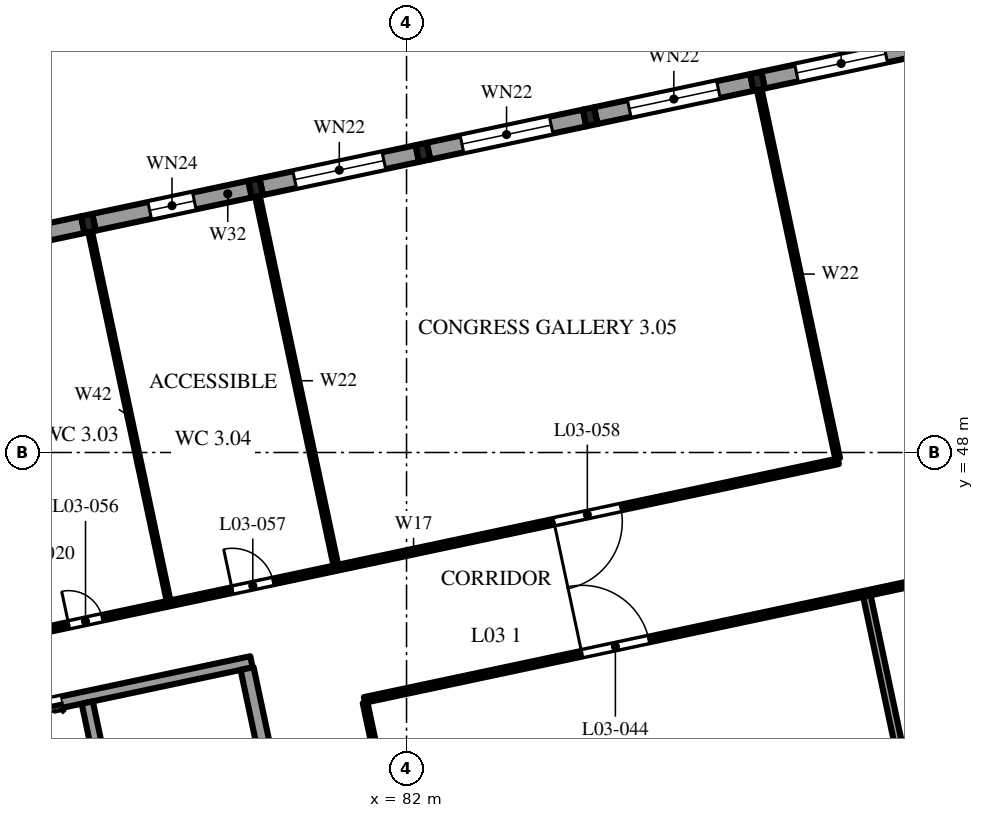
"""IFC4 building model, lengths in metres.
Left out: names, types, materials, properties, quantities, classifications, styles, units other than length and angle.
Written with IfcOpenShell. Run it as: python <this file> out.ifc"""

import sys

from ifc_helpers import new_model, si_unit, direction, frame, frame_2d, origin, origin_2d, place, context, subcontext, project, spatial, polyline, rectangle, i_section, outline, extrude, element, fill, save


model = new_model("IFC4")
c1 = context("Model", 3, precision=1e-05, world=origin(), true_north=direction((0.0, 1.0)))
c2 = subcontext(c1, "Body", "Model", "MODEL_VIEW")
j1 = project(units=[si_unit("LENGTHUNIT", "METRE"), si_unit("PLANEANGLEUNIT", "RADIAN")], contexts=[c1])
p1 = place(None, origin())
s1 = spatial("IfcSite", under=j1, at=p1, CompositionType="ELEMENT")
p2 = place(p1, origin())
s2 = spatial("IfcBuilding", under=s1, at=p2, CompositionType="ELEMENT")
p3 = place(p2, frame((0.0, 0.0, 16.8)))
s3 = spatial("IfcBuildingStorey", under=s2, at=p3, CompositionType="ELEMENT", Elevation=16.8)
for number, where, z_axis, x_axis in (
    (1, (73.628, 54.027, 0.0), (0.0, 0.0, 1.0), (0.978, 0.208, 0.0)),
    (2, (78.03, 54.963, 0.0), (0.0, 0.0, 1.0), (0.978, 0.208, 0.0)),
    (3, (82.431, 55.898, 0.0), (0.0, 0.0, 1.0), (0.978, 0.208, 0.0)),
    (4, (86.833, 56.834, 0.0), (0.0, 0.0, 1.0), (0.978, 0.208, 0.0)),
    (5, (91.234, 57.77, 0.0), (0.0, 0.0, 1.0), (0.978, 0.208, 0.0)),
):
    element("IfcColumn", number, at=place(p3, frame(where, z_axis=z_axis, x_axis=x_axis)), inside=s3, PredefinedType="COLUMN", context=c2, shape_type="SweptSolid", body=[
        extrude(i_section(OverallWidth=0.3, OverallDepth=0.45, WebThickness=0.014, FlangeThickness=0.026, FilletRadius=0.027, at=origin_2d()), origin(), (0.0, 0.0, 1.0), 4.8),
    ])
p4 = place(p3, frame((64.519, 39.644, 0.0), z_axis=(0.0, 0.0, 1.0), x_axis=(0.978147662755, 0.20791139903, 0.0)))
e6 = element("IfcWall", 6, at=p4, inside=s3, PredefinedType="SHEAR", context=c2, shape_type="SweptSolid", body=[
    extrude(outline(polyline([(0.0, 0.0), (13.7, 0.0), (13.7, 7.26), (0.0, 6.527), (0.0, 0.0)])), frame((0.0, 0.15, 0.0), z_axis=(0.0, -1.0, 0.0), x_axis=(1.0, 0.0, 0.0)), (0.0, 0.0, 1.0), 0.3),
])
p5 = place(p4, frame((5.1, 0.0, 0.0)))
e7 = element("IfcOpeningElement", 7, at=p5, cuts=e6, PredefinedType="OPENING", context=c2, shape_type="SweptSolid", body=[
    extrude(rectangle(XDim=1.1, YDim=2.1, at=frame_2d((0.55, 1.05))), frame((0.0, 0.16, 0.0), z_axis=(0.0, -1.0, 0.0), x_axis=(1.0, 0.0, 0.0)), (0.0, 0.0, 1.0), 0.32),
])
p6 = place(p4, frame((7.5, 0.0, 0.0)))
e8 = element("IfcOpeningElement", 8, at=p6, cuts=e6, PredefinedType="OPENING", context=c2, shape_type="SweptSolid", body=[
    extrude(rectangle(XDim=1.1, YDim=2.1, at=frame_2d((0.55, 1.05))), frame((0.0, 0.16, 0.0), z_axis=(0.0, -1.0, 0.0), x_axis=(1.0, 0.0, 0.0)), (0.0, 0.0, 1.0), 0.32),
])
p7 = place(p3, frame((79.468, 34.49, 0.0), z_axis=(0.0, 0.0, 1.0), x_axis=(-0.207915693476, 0.978146749934, 0.0)))
e9 = element("IfcWall", 9, at=p7, inside=s3, PredefinedType="SOLIDWALL", context=c2, shape_type="SweptSolid", body=[
    extrude(outline(polyline([(0.0, 0.0), (8.0, 0.0), (8.0, 7.26), (0.0, 7.679), (0.0, 0.0)])), frame((0.0, 0.175, 0.0), z_axis=(0.0, -1.0, 0.0), x_axis=(1.0, 0.0, 0.0)), (0.0, 0.0, 1.0), 0.35),
])
p8 = place(p7, frame((0.3, 0.0, 0.0)))
e10 = element("IfcOpeningElement", 10, at=p8, cuts=e9, PredefinedType="OPENING", context=c2, shape_type="SweptSolid", body=[
    extrude(rectangle(XDim=1.2, YDim=2.1, at=frame_2d((0.6, 1.05))), frame((0.0, 0.185, 0.0), z_axis=(0.0, -1.0, 0.0), x_axis=(1.0, 0.0, 0.0)), (0.0, 0.0, 1.0), 0.37),
])
p9 = place(p3, frame((75.261, 33.595, 0.0), z_axis=(0.0, 0.0, 1.0), x_axis=(-0.207915693476, 0.978146749934, 0.0)))
e11 = element("IfcWall", 11, at=p9, inside=s3, PredefinedType="SHEAR", context=c2, shape_type="SweptSolid", body=[
    extrude(outline(polyline([(0.0, 0.0), (8.0, 0.0), (8.0, 7.03), (0.0, 7.449), (0.0, 0.0)])), frame((0.0, 0.15, 0.0), z_axis=(0.0, -1.0, 0.0), x_axis=(1.0, 0.0, 0.0)), (0.0, 0.0, 1.0), 0.3),
])
p10 = place(p3, frame((69.373, 53.123, 0.0), z_axis=(0.0, 0.0, 1.0), x_axis=(0.978143927149, 0.207928972925, 0.0)))
e12 = element("IfcWall", 12, at=p10, inside=s3, PredefinedType="SOLIDWALL", context=c2, shape_type="SweptSolid", body=[
    extrude(outline(polyline([(0.0, 0.0), (4.2, 0.0), (4.2, 7.817), (0.0, 7.593), (0.0, 0.0)])), frame((0.0, 0.225, 0.0), z_axis=(0.0, -1.0, 0.0), x_axis=(1.0, 0.0, 0.0)), (0.0, 0.0, 1.0), 0.45),
])
p11 = place(p10, frame((1.5, 0.0, 1.5)))
e13 = element("IfcOpeningElement", 13, at=p11, cuts=e12, PredefinedType="OPENING", context=c2, shape_type="SweptSolid", body=[
    extrude(rectangle(XDim=1.2, YDim=1.2, at=frame_2d((0.6, 0.6))), frame((0.0, 0.235, 0.0), z_axis=(0.0, -1.0, 0.0), x_axis=(1.0, 0.0, 0.0)), (0.0, 0.0, 1.0), 0.47),
])
p12 = place(p3, frame((73.774, 54.058, 0.0), z_axis=(0.0, 0.0, 1.0), x_axis=(0.978146440129, 0.207917150959, 0.0)))
e14 = element("IfcWall", 14, at=p12, inside=s3, PredefinedType="SOLIDWALL", context=c2, shape_type="SweptSolid", body=[
    extrude(outline(polyline([(0.0, 0.0), (4.2, 0.0), (4.2, 8.058), (0.0, 7.833), (0.0, 0.0)])), frame((0.0, 0.225, 0.0), z_axis=(0.0, -1.0, 0.0), x_axis=(1.0, 0.0, 0.0)), (0.0, 0.0, 1.0), 0.45),
])
p13 = place(p12, frame((1.5, 0.0, 1.5)))
e15 = element("IfcOpeningElement", 15, at=p13, cuts=e14, PredefinedType="OPENING", context=c2, shape_type="SweptSolid", body=[
    extrude(rectangle(XDim=1.2, YDim=1.2, at=frame_2d((0.6, 0.6))), frame((0.0, 0.235, 0.0), z_axis=(0.0, -1.0, 0.0), x_axis=(1.0, 0.0, 0.0)), (0.0, 0.0, 1.0), 0.47),
])
p14 = place(p3, frame((78.176, 54.994, 0.0), z_axis=(0.0, 0.0, 1.0), x_axis=(0.978143927149, 0.207928972925, 0.0)))
e16 = element("IfcWall", 16, at=p14, inside=s3, PredefinedType="SOLIDWALL", context=c2, shape_type="SweptSolid", body=[
    extrude(outline(polyline([(0.0, 0.0), (4.2, 0.0), (4.2, 8.299), (0.0, 8.074), (0.0, 0.0)])), frame((0.0, 0.225, 0.0), z_axis=(0.0, -1.0, 0.0), x_axis=(1.0, 0.0, 0.0)), (0.0, 0.0, 1.0), 0.45),
])
p15 = place(p14, frame((0.9, 0.0, 0.9)))
e17 = element("IfcOpeningElement", 17, at=p15, cuts=e16, PredefinedType="OPENING", context=c2, shape_type="SweptSolid", body=[
    extrude(rectangle(XDim=2.4, YDim=2.4, at=frame_2d((1.2, 1.2))), frame((0.0, 0.235, 0.0), z_axis=(0.0, -1.0, 0.0), x_axis=(1.0, 0.0, 0.0)), (0.0, 0.0, 1.0), 0.47),
])
p16 = place(p3, frame((82.578, 55.93, 0.0), z_axis=(0.0, 0.0, 1.0), x_axis=(0.978155748334, 0.207873355681, 0.0)))
e18 = element("IfcWall", 18, at=p16, inside=s3, PredefinedType="SOLIDWALL", context=c2, shape_type="SweptSolid", body=[
    extrude(outline(polyline([(0.0, 0.0), (4.2, 0.0), (4.2, 8.54), (0.0, 8.315), (0.0, 0.0)])), frame((0.0, 0.225, 0.0), z_axis=(0.0, -1.0, 0.0), x_axis=(1.0, 0.0, 0.0)), (0.0, 0.0, 1.0), 0.45),
])
p17 = place(p16, frame((0.9, 0.0, 0.9)))
e19 = element("IfcOpeningElement", 19, at=p17, cuts=e18, PredefinedType="OPENING", context=c2, shape_type="SweptSolid", body=[
    extrude(rectangle(XDim=2.4, YDim=2.4, at=frame_2d((1.2, 1.2))), frame((0.0, 0.235, 0.0), z_axis=(0.0, -1.0, 0.0), x_axis=(1.0, 0.0, 0.0)), (0.0, 0.0, 1.0), 0.47),
])
p18 = place(p3, frame((86.979, 56.865, 0.0), z_axis=(0.0, 0.0, 1.0), x_axis=(0.978143927149, 0.207928972925, 0.0)))
e20 = element("IfcWall", 20, at=p18, inside=s3, PredefinedType="SOLIDWALL", context=c2, shape_type="SweptSolid", body=[
    extrude(outline(polyline([(0.0, 0.0), (4.2, 0.0), (4.2, 8.78), (0.0, 8.556), (0.0, 0.0)])), frame((0.0, 0.225, 0.0), z_axis=(0.0, -1.0, 0.0), x_axis=(1.0, 0.0, 0.0)), (0.0, 0.0, 1.0), 0.45),
])
p19 = place(p18, frame((0.9, 0.0, 0.9)))
e21 = element("IfcOpeningElement", 21, at=p19, cuts=e20, PredefinedType="OPENING", context=c2, shape_type="SweptSolid", body=[
    extrude(rectangle(XDim=2.4, YDim=2.4, at=frame_2d((1.2, 1.2))), frame((0.0, 0.235, 0.0), z_axis=(0.0, -1.0, 0.0), x_axis=(1.0, 0.0, 0.0)), (0.0, 0.0, 1.0), 0.47),
])
p20 = place(p3, frame((91.381, 57.801, 0.0), z_axis=(0.0, 0.0, 1.0), x_axis=(0.978143927149, 0.207928972925, 0.0)))
e22 = element("IfcWall", 22, at=p20, inside=s3, PredefinedType="SOLIDWALL", context=c2, shape_type="SweptSolid", body=[
    extrude(outline(polyline([(0.0, 0.0), (4.2, 0.0), (4.2, 9.021), (0.0, 8.796), (0.0, 0.0)])), frame((0.0, 0.225, 0.0), z_axis=(0.0, -1.0, 0.0), x_axis=(1.0, 0.0, 0.0)), (0.0, 0.0, 1.0), 0.45),
])
p21 = place(p20, frame((0.9, 0.0, 0.45)))
e23 = element("IfcOpeningElement", 23, at=p21, cuts=e22, PredefinedType="OPENING", context=c2, shape_type="SweptSolid", body=[
    extrude(rectangle(XDim=2.4, YDim=3.3, at=frame_2d((1.2, 1.65))), frame((0.0, 0.235, 0.0), z_axis=(0.0, -1.0, 0.0), x_axis=(1.0, 0.0, 0.0)), (0.0, 0.0, 1.0), 0.47),
])
p22 = place(p3, frame((80.893, 41.489, 0.0), z_axis=(0.0, 0.0, 1.0), x_axis=(0.97814724207, 0.20791337819, 0.0)))
e24 = element("IfcWall", 24, at=p22, inside=s3, PredefinedType="PARTITIONING", context=c2, shape_type="SweptSolid", body=[
    extrude(outline(polyline([(0.0, 0.0), (49.5, 0.0), (49.5, 9.336), (0.0, 6.688), (0.0, 0.0)])), frame((0.0, 0.075, 0.0), z_axis=(0.0, -1.0, 0.0), x_axis=(1.0, 0.0, 0.0)), (0.0, 0.0, 1.0), 0.15),
])
p23 = place(p22, frame((5.85, 0.0, 0.0)))
e25 = element("IfcOpeningElement", 25, at=p23, cuts=e24, PredefinedType="OPENING", context=c2, shape_type="SweptSolid", body=[
    extrude(rectangle(XDim=1.8, YDim=2.1, at=frame_2d((0.9, 1.05))), frame((0.0, 0.085, 0.0), z_axis=(0.0, -1.0, 0.0), x_axis=(1.0, 0.0, 0.0)), (0.0, 0.0, 1.0), 0.17),
])
p24 = place(p22, frame((17.25, 0.0, 0.0)))
e26 = element("IfcOpeningElement", 26, at=p24, cuts=e24, PredefinedType="OPENING", context=c2, shape_type="SweptSolid", body=[
    extrude(rectangle(XDim=1.5, YDim=2.1, at=frame_2d((0.75, 1.05))), frame((0.0, 0.085, 0.0), z_axis=(0.0, -1.0, 0.0), x_axis=(1.0, 0.0, 0.0)), (0.0, 0.0, 1.0), 0.17),
])
p25 = place(p22, frame((28.35, 0.0, 0.0)))
e27 = element("IfcOpeningElement", 27, at=p25, cuts=e24, PredefinedType="OPENING", context=c2, shape_type="SweptSolid", body=[
    extrude(rectangle(XDim=1.8, YDim=2.1, at=frame_2d((0.9, 1.05))), frame((0.0, 0.085, 0.0), z_axis=(0.0, -1.0, 0.0), x_axis=(1.0, 0.0, 0.0)), (0.0, 0.0, 1.0), 0.17),
])
p26 = place(p22, frame((41.85, 0.0, 0.0)))
e28 = element("IfcOpeningElement", 28, at=p26, cuts=e24, PredefinedType="OPENING", context=c2, shape_type="SweptSolid", body=[
    extrude(rectangle(XDim=1.8, YDim=2.1, at=frame_2d((0.9, 1.05))), frame((0.0, 0.085, 0.0), z_axis=(0.0, -1.0, 0.0), x_axis=(1.0, 0.0, 0.0)), (0.0, 0.0, 1.0), 0.17),
])
p27 = place(p3, frame((82.972, 31.707, 0.0), z_axis=(0.0, 0.0, 1.0), x_axis=(-0.207904355568, 0.978149159861, 0.0)))
e29 = element("IfcWall", 29, at=p27, inside=s3, PredefinedType="PARTITIONING", context=c2, shape_type="SweptSolid", body=[
    extrude(outline(polyline([(0.0, 0.0), (9.925, 0.0), (9.925, 5.973), (0.0, 5.973), (0.0, 0.0)])), frame((0.0, 0.062, 0.0), z_axis=(0.0, -1.0, 0.0), x_axis=(1.0, 0.0, 0.0)), (0.0, 0.0, 1.0), 0.125),
])
p28 = place(p3, frame((96.177, 34.514, 0.0), z_axis=(0.0, 0.0, 1.0), x_axis=(-0.20790935802, 0.978148096582, 0.0)))
e30 = element("IfcWall", 30, at=p28, inside=s3, PredefinedType="PARTITIONING", context=c2, shape_type="SweptSolid", body=[
    extrude(outline(polyline([(0.0, 0.0), (9.925, 0.0), (9.925, 6.696), (0.0, 6.696), (0.0, 0.0)])), frame((0.0, 0.1, 0.0), z_axis=(0.0, -1.0, 0.0), x_axis=(1.0, 0.0, 0.0)), (0.0, 0.0, 1.0), 0.2),
])
p29 = place(p3, frame((59.663, 40.605, 0.0), z_axis=(0.0, 0.0, 1.0), x_axis=(0.978147466509, 0.207912322295, 0.0)))
e31 = element("IfcWall", 31, at=p29, inside=s3, PredefinedType="PARTITIONING", context=c2, shape_type="SweptSolid", body=[
    extrude(outline(polyline([(0.0, 0.0), (34.45, 0.0), (34.45, 7.224), (0.0, 5.381), (0.0, 0.0)])), frame((0.0, 0.075, 0.0), z_axis=(0.0, -1.0, 0.0), x_axis=(1.0, 0.0, 0.0)), (0.0, 0.0, 1.0), 0.15),
])
p30 = place(p29, frame((3.225, 0.0, 0.0)))
e32 = element("IfcOpeningElement", 32, at=p30, cuts=e31, PredefinedType="OPENING", context=c2, shape_type="SweptSolid", body=[
    extrude(rectangle(XDim=1.0, YDim=2.1, at=frame_2d((0.5, 1.05))), frame((0.0, 0.085, 0.0), z_axis=(0.0, -1.0, 0.0), x_axis=(1.0, 0.0, 0.0)), (0.0, 0.0, 1.0), 0.17),
])
p31 = place(p29, frame((9.25, 0.0, 0.0)))
e33 = element("IfcOpeningElement", 33, at=p31, cuts=e31, PredefinedType="OPENING", context=c2, shape_type="SweptSolid", body=[
    extrude(rectangle(XDim=0.9, YDim=2.1, at=frame_2d((0.45, 1.05))), frame((0.0, 0.085, 0.0), z_axis=(0.0, -1.0, 0.0), x_axis=(1.0, 0.0, 0.0)), (0.0, 0.0, 1.0), 0.17),
])
p32 = place(p29, frame((13.75, 0.0, 0.0)))
e34 = element("IfcOpeningElement", 34, at=p32, cuts=e31, PredefinedType="OPENING", context=c2, shape_type="SweptSolid", body=[
    extrude(rectangle(XDim=0.9, YDim=2.1, at=frame_2d((0.45, 1.05))), frame((0.0, 0.085, 0.0), z_axis=(0.0, -1.0, 0.0), x_axis=(1.0, 0.0, 0.0)), (0.0, 0.0, 1.0), 0.17),
])
p33 = place(p29, frame((18.15, 0.0, 0.0)))
e35 = element("IfcOpeningElement", 35, at=p33, cuts=e31, PredefinedType="OPENING", context=c2, shape_type="SweptSolid", body=[
    extrude(rectangle(XDim=1.1, YDim=2.1, at=frame_2d((0.55, 1.05))), frame((0.0, 0.085, 0.0), z_axis=(0.0, -1.0, 0.0), x_axis=(1.0, 0.0, 0.0)), (0.0, 0.0, 1.0), 0.17),
])
p34 = place(p29, frame((26.8, 0.0, 0.0)))
e36 = element("IfcOpeningElement", 36, at=p34, cuts=e31, PredefinedType="OPENING", context=c2, shape_type="SweptSolid", body=[
    extrude(rectangle(XDim=1.8, YDim=2.1, at=frame_2d((0.9, 1.05))), frame((0.0, 0.085, 0.0), z_axis=(0.0, -1.0, 0.0), x_axis=(1.0, 0.0, 0.0)), (0.0, 0.0, 1.0), 0.17),
])
p35 = place(p3, frame((73.675, 53.807, 0.0), z_axis=(0.0, 0.0, 1.0), x_axis=(0.207904355568, -0.978149159861, 0.0)))
e37 = element("IfcWall", 37, at=p35, inside=s3, PredefinedType="PARTITIONING", context=c2, shape_type="SweptSolid", body=[
    extrude(outline(polyline([(0.0, 0.0), (9.925, 0.0), (9.925, 6.032), (0.0, 5.737), (0.0, 0.0)])), frame((0.0, 0.05, 0.0), z_axis=(0.0, -1.0, 0.0), x_axis=(1.0, 0.0, 0.0)), (0.0, 0.0, 1.0), 0.1),
])
p36 = place(p3, frame((78.076, 54.743, 0.0), z_axis=(0.0, 0.0, 1.0), x_axis=(0.20790935802, -0.978148096582, 0.0)))
e38 = element("IfcWall", 38, at=p36, inside=s3, PredefinedType="PARTITIONING", context=c2, shape_type="SweptSolid", body=[
    extrude(outline(polyline([(0.0, 0.0), (9.925, 0.0), (9.925, 5.973), (0.0, 5.973), (0.0, 0.0)])), frame((0.0, 0.062, 0.0), z_axis=(0.0, -1.0, 0.0), x_axis=(1.0, 0.0, 0.0)), (0.0, 0.0, 1.0), 0.125),
])
p37 = place(p3, frame((91.281, 57.55, 0.0), z_axis=(0.0, 0.0, 1.0), x_axis=(0.207904355568, -0.978149159861, 0.0)))
e39 = element("IfcWall", 39, at=p37, inside=s3, PredefinedType="PARTITIONING", context=c2, shape_type="SweptSolid", body=[
    extrude(outline(polyline([(0.0, 0.0), (9.925, 0.0), (9.925, 6.696), (0.0, 6.696), (0.0, 0.0)])), frame((0.0, 0.062, 0.0), z_axis=(0.0, -1.0, 0.0), x_axis=(1.0, 0.0, 0.0)), (0.0, 0.0, 1.0), 0.125),
])
p38 = place(p13, origin())
e40 = element("IfcWindow", 40, at=p38, inside=s3, PartitioningType="SINGLE_PANEL", PredefinedType="WINDOW", context=c2, shape_type="SweptSolid", body=[
    extrude(rectangle(XDim=1.2, YDim=1.2, at=frame_2d((0.6, 0.6))), frame((0.0, 0.03, 0.0), z_axis=(0.0, -1.0, 0.0), x_axis=(1.0, 0.0, 0.0)), (0.0, 0.0, 1.0), 0.06),
])
fill(e15, e40)
p39 = place(p15, origin())
e41 = element("IfcWindow", 41, at=p39, inside=s3, PartitioningType="SINGLE_PANEL", PredefinedType="WINDOW", context=c2, shape_type="SweptSolid", body=[
    extrude(rectangle(XDim=2.4, YDim=2.4, at=frame_2d((1.2, 1.2))), frame((0.0, 0.03, 0.0), z_axis=(0.0, -1.0, 0.0), x_axis=(1.0, 0.0, 0.0)), (0.0, 0.0, 1.0), 0.06),
])
fill(e17, e41)
p40 = place(p17, origin())
e42 = element("IfcWindow", 42, at=p40, inside=s3, PartitioningType="SINGLE_PANEL", PredefinedType="WINDOW", context=c2, shape_type="SweptSolid", body=[
    extrude(rectangle(XDim=2.4, YDim=2.4, at=frame_2d((1.2, 1.2))), frame((0.0, 0.03, 0.0), z_axis=(0.0, -1.0, 0.0), x_axis=(1.0, 0.0, 0.0)), (0.0, 0.0, 1.0), 0.06),
])
fill(e19, e42)
p41 = place(p19, origin())
e43 = element("IfcWindow", 43, at=p41, inside=s3, PartitioningType="SINGLE_PANEL", PredefinedType="WINDOW", context=c2, shape_type="SweptSolid", body=[
    extrude(rectangle(XDim=2.4, YDim=2.4, at=frame_2d((1.2, 1.2))), frame((0.0, 0.03, 0.0), z_axis=(0.0, -1.0, 0.0), x_axis=(1.0, 0.0, 0.0)), (0.0, 0.0, 1.0), 0.06),
])
fill(e21, e43)
p42 = place(p21, origin())
e44 = element("IfcWindow", 44, at=p42, inside=s3, PartitioningType="DOUBLE_PANEL_VERTICAL", PredefinedType="WINDOW", context=c2, shape_type="SweptSolid", body=[
    extrude(rectangle(XDim=2.4, YDim=3.3, at=frame_2d((1.2, 1.65))), frame((0.0, 0.03, 0.0), z_axis=(0.0, -1.0, 0.0), x_axis=(1.0, 0.0, 0.0)), (0.0, 0.0, 1.0), 0.06),
])
fill(e23, e44)
p43 = place(p6, origin())
e45 = element("IfcDoor", 45, at=p43, inside=s3, OperationType="DOUBLE_DOOR_SLIDING", PredefinedType="DOOR", context=c2, shape_type="SweptSolid", body=[
    extrude(rectangle(XDim=1.1, YDim=2.1, at=frame_2d((0.55, 1.05))), frame((0.0, 0.025, 0.0), z_axis=(0.0, -1.0, 0.0), x_axis=(1.0, 0.0, 0.0)), (0.0, 0.0, 1.0), 0.05),
])
fill(e8, e45)
p44 = place(p23, origin())
e46 = element("IfcDoor", 46, at=p44, inside=s3, OperationType="DOUBLE_DOOR_SINGLE_SWING", PredefinedType="DOOR", context=c2, shape_type="SweptSolid", body=[
    extrude(rectangle(XDim=1.8, YDim=2.1, at=frame_2d((0.9, 1.05))), frame((0.0, 0.025, 0.0), z_axis=(0.0, -1.0, 0.0), x_axis=(1.0, 0.0, 0.0)), (0.0, 0.0, 1.0), 0.05),
])
fill(e25, e46)
p45 = place(p32, origin())
e47 = element("IfcDoor", 47, at=p45, inside=s3, OperationType="SINGLE_SWING_RIGHT", PredefinedType="DOOR", context=c2, shape_type="SweptSolid", body=[
    extrude(rectangle(XDim=0.9, YDim=2.1, at=frame_2d((0.45, 1.05))), frame((0.0, 0.025, 0.0), z_axis=(0.0, -1.0, 0.0), x_axis=(1.0, 0.0, 0.0)), (0.0, 0.0, 1.0), 0.05),
])
fill(e34, e47)
p46 = place(p33, origin())
e48 = element("IfcDoor", 48, at=p46, inside=s3, OperationType="SINGLE_SWING_LEFT", PredefinedType="DOOR", context=c2, shape_type="SweptSolid", body=[
    extrude(rectangle(XDim=1.1, YDim=2.1, at=frame_2d((0.55, 1.05))), frame((0.0, 0.025, 0.0), z_axis=(0.0, -1.0, 0.0), x_axis=(1.0, 0.0, 0.0)), (0.0, 0.0, 1.0), 0.05),
])
fill(e35, e48)
p47 = place(p34, frame((1.8, 0.0, 0.0), z_axis=(0.0, 0.0, 1.0), x_axis=(-1.0, 0.0, 0.0)))
e49 = element("IfcDoor", 49, at=p47, inside=s3, OperationType="DOUBLE_DOOR_SINGLE_SWING", PredefinedType="DOOR", context=c2, shape_type="SweptSolid", body=[
    extrude(rectangle(XDim=1.8, YDim=2.1, at=frame_2d((0.9, 1.05))), frame((0.0, 0.025, 0.0), z_axis=(0.0, -1.0, 0.0), x_axis=(1.0, 0.0, 0.0)), (0.0, 0.0, 1.0), 0.05),
])
fill(e36, e49)
save(model, sys.argv[1])
